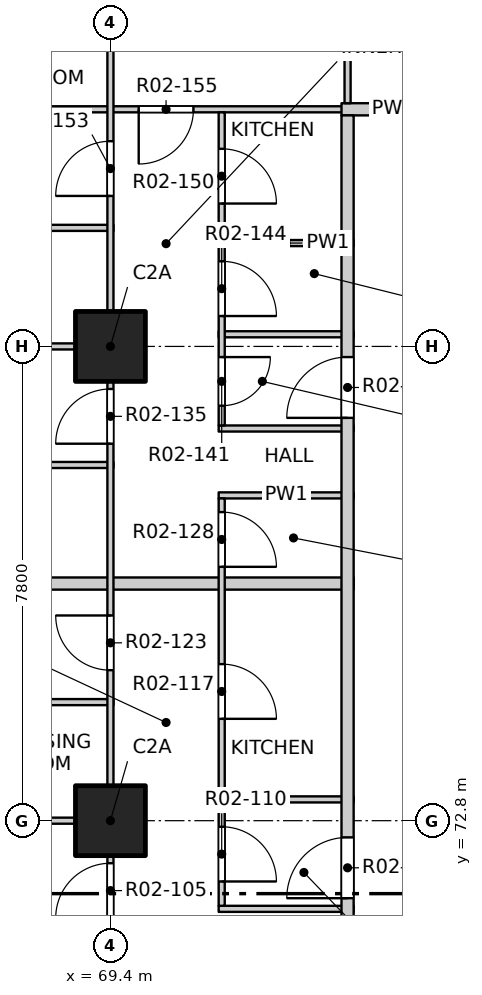
"""IFC4 building model, lengths in metres.
Left out: names, types, materials, properties, quantities, classifications, styles, units other than length and angle.
Written with IfcOpenShell. Run it as: python <this file> out.ifc"""

import sys

from ifc_helpers import new_model, si_unit, direction, frame, frame_2d, origin, origin_2d, place, context, subcontext, project, spatial, rectangle, extrude, element, fill, save


model = new_model("IFC4")
c1 = context("Model", 3, precision=1e-05, world=origin(), true_north=direction((0.0, 1.0)))
c2 = subcontext(c1, "Body", "Model", "MODEL_VIEW")
j1 = project(units=[si_unit("LENGTHUNIT", "METRE"), si_unit("PLANEANGLEUNIT", "RADIAN")], contexts=[c1])
p1 = place(None, origin())
s1 = spatial("IfcSite", under=j1, at=p1, CompositionType="ELEMENT")
p2 = place(p1, origin())
s2 = spatial("IfcBuilding", under=s1, at=p2, CompositionType="ELEMENT")
p3 = place(p2, frame((0.0, 0.0, 36.5)))
s3 = spatial("IfcBuildingStorey", under=s2, at=p3, CompositionType="ELEMENT", Elevation=36.5)
for number, where, z_axis, x_axis in (
    (1, (69.4, 72.8, -0.25), (0.0, 0.0, 1.0), (1.0, 0.0, 0.0)),
    (2, (69.4, 80.6, -0.25), (0.0, 0.0, 1.0), (1.0, 0.0, 0.0)),
):
    element("IfcColumn", number, at=place(p3, frame(where, z_axis=z_axis, x_axis=x_axis)), inside=s3, PredefinedType="COLUMN", context=c2, shape_type="SweptSolid", body=[
        extrude(rectangle(XDim=1.15, YDim=1.15, at=origin_2d()), origin(), (0.0, 0.0, 1.0), 3.4),
    ])
p4 = place(p3, frame((71.18, 71.35, 0.0), z_axis=(0.0, 0.0, 1.0), x_axis=(1.0, 0.0, 0.0)))
e3 = element("IfcWall", 3, at=p4, inside=s3, PredefinedType="PARTITIONING", context=c2, shape_type="SweptSolid", body=[
    extrude(rectangle(XDim=2.22, YDim=0.1, at=frame_2d((1.11, 0.0))), origin(), (0.0, 0.0, 1.0), 3.15),
])
p5 = place(p3, frame((61.9, 72.8, 0.0), z_axis=(0.0, 0.0, 1.0), x_axis=(1.0, 0.0, 0.0)))
e4 = element("IfcWall", 4, at=p5, inside=s3, PredefinedType="PARTITIONING", context=c2, shape_type="SweptSolid", body=[
    extrude(rectangle(XDim=7.55, YDim=0.1, at=frame_2d((3.775, 0.0))), origin(), (0.0, 0.0, 1.0), 2.55),
])
p6 = place(p3, frame((71.18, 73.15, 0.0), z_axis=(0.0, 0.0, 1.0), x_axis=(1.0, 0.0, 0.0)))
e5 = element("IfcWall", 5, at=p6, inside=s3, PredefinedType="PARTITIONING", context=c2, shape_type="SweptSolid", body=[
    extrude(rectangle(XDim=2.22, YDim=0.1, at=frame_2d((1.11, 0.0))), origin(), (0.0, 0.0, 1.0), 3.15),
])
p7 = place(p3, frame((66.05, 74.75, 0.0), z_axis=(0.0, 0.0, 1.0), x_axis=(1.0, 0.0, 0.0)))
e6 = element("IfcWall", 6, at=p7, inside=s3, PredefinedType="PARTITIONING", context=c2, shape_type="SweptSolid", body=[
    extrude(rectangle(XDim=3.4, YDim=0.1, at=frame_2d((1.7, 0.0))), origin(), (0.0, 0.0, 1.0), 3.15),
])
p8 = place(p3, frame((61.9, 76.7, 0.0), z_axis=(0.0, 0.0, 1.0), x_axis=(1.0, 0.0, 0.0)))
e7 = element("IfcWall", 7, at=p8, inside=s3, PredefinedType="PARTITIONING", context=c2, shape_type="SweptSolid", body=[
    extrude(rectangle(XDim=11.5, YDim=0.2, at=frame_2d((5.75, 0.0))), origin(), (0.0, 0.0, 1.0), 3.15),
])
p9 = place(p3, frame((71.18, 78.15, 0.0), z_axis=(0.0, 0.0, 1.0), x_axis=(1.0, 0.0, 0.0)))
e8 = element("IfcWall", 8, at=p9, inside=s3, PredefinedType="PARTITIONING", context=c2, shape_type="SweptSolid", body=[
    extrude(rectangle(XDim=2.22, YDim=0.1, at=frame_2d((1.11, 0.0))), origin(), (0.0, 0.0, 1.0), 3.15),
])
p10 = place(p3, frame((65.75, 78.65, 0.0), z_axis=(0.0, 0.0, 1.0), x_axis=(1.0, 0.0, 0.0)))
e9 = element("IfcWall", 9, at=p10, inside=s3, PredefinedType="PARTITIONING", context=c2, shape_type="SweptSolid", body=[
    extrude(rectangle(XDim=3.7, YDim=0.1, at=frame_2d((1.85, 0.0))), origin(), (0.0, 0.0, 1.0), 3.15),
])
p11 = place(p3, frame((71.18, 79.25, 0.0), z_axis=(0.0, 0.0, 1.0), x_axis=(1.0, 0.0, 0.0)))
e10 = element("IfcWall", 10, at=p11, inside=s3, PredefinedType="PARTITIONING", context=c2, shape_type="SweptSolid", body=[
    extrude(rectangle(XDim=2.22, YDim=0.1, at=frame_2d((1.11, 0.0))), origin(), (0.0, 0.0, 1.0), 3.15),
])
p12 = place(p3, frame((61.9, 80.6, 0.0), z_axis=(0.0, 0.0, 1.0), x_axis=(1.0, 0.0, 0.0)))
e11 = element("IfcWall", 11, at=p12, inside=s3, PredefinedType="PARTITIONING", context=c2, shape_type="SweptSolid", body=[
    extrude(rectangle(XDim=7.55, YDim=0.1, at=frame_2d((3.775, 0.0))), origin(), (0.0, 0.0, 1.0), 2.55),
])
for number, where, z_axis, x_axis in (
    (12, (71.18, 80.8, 0.0), (0.0, 0.0, 1.0), (1.0, 0.0, 0.0)),
    (13, (71.18, 82.3, 0.0), (0.0, 0.0, 1.0), (1.0, 0.0, 0.0)),
):
    element("IfcWall", number, at=place(p3, frame(where, z_axis=z_axis, x_axis=x_axis)), inside=s3, PredefinedType="PARTITIONING", context=c2, shape_type="SweptSolid", body=[
        extrude(rectangle(XDim=2.22, YDim=0.1, at=frame_2d((1.11, 0.0))), origin(), (0.0, 0.0, 1.0), 3.15),
    ])
p13 = place(p3, frame((65.75, 82.55, 0.0), z_axis=(0.0, 0.0, 1.0), x_axis=(1.0, 0.0, 0.0)))
e14 = element("IfcWall", 14, at=p13, inside=s3, PredefinedType="PARTITIONING", context=c2, shape_type="SweptSolid", body=[
    extrude(rectangle(XDim=3.7, YDim=0.1, at=frame_2d((1.85, 0.0))), origin(), (0.0, 0.0, 1.0), 3.15),
])
p14 = place(p3, frame((61.9, 84.5, 0.0), z_axis=(0.0, 0.0, 1.0), x_axis=(1.0, 0.0, 0.0)))
e15 = element("IfcWall", 15, at=p14, inside=s3, PredefinedType="PARTITIONING", context=c2, shape_type="SweptSolid", body=[
    extrude(rectangle(XDim=11.5, YDim=0.1, at=frame_2d((5.75, 0.0))), origin(), (0.0, 0.0, 1.0), 3.15),
])
p15 = place(p14, frame((7.965, 0.0, 0.0)))
e16 = element("IfcOpeningElement", 16, at=p15, cuts=e15, PredefinedType="OPENING", context=c2, shape_type="SweptSolid", body=[
    extrude(rectangle(XDim=0.9, YDim=2.1, at=frame_2d((0.45, 1.05))), frame((0.0, 0.06, 0.0), z_axis=(0.0, -1.0, 0.0), x_axis=(1.0, 0.0, 0.0)), (0.0, 0.0, 1.0), 0.12),
])
p16 = place(p3, frame((73.2, 84.5, 0.0), z_axis=(0.0, 0.0, 1.0), x_axis=(1.0, 0.0, 0.0)))
e17 = element("IfcWall", 17, at=p16, inside=s3, PredefinedType="PARTITIONING", context=c2, shape_type="SweptSolid", body=[
    extrude(rectangle(XDim=1.7, YDim=0.2, at=frame_2d((0.85, 0.0))), origin(), (0.0, 0.0, 1.0), 3.15),
])
p17 = place(p3, frame((69.4, 41.9, 0.0), z_axis=(0.0, 0.0, 1.0), x_axis=(0.0, 1.0, 0.0)))
e18 = element("IfcWall", 18, at=p17, inside=s3, PredefinedType="PARTITIONING", context=c2, shape_type="SweptSolid", body=[
    extrude(rectangle(XDim=46.2, YDim=0.1, at=frame_2d((23.1, 0.0))), origin(), (0.0, 0.0, 1.0), 3.15),
])
p18 = place(p17, frame((1.2, 0.0, 0.0)))
e19 = element("IfcOpeningElement", 19, at=p18, cuts=e18, PredefinedType="OPENING", context=c2, shape_type="SweptSolid", body=[
    extrude(rectangle(XDim=0.9, YDim=2.1, at=frame_2d((0.45, 1.05))), frame((0.0, 0.06, 0.0), z_axis=(0.0, -1.0, 0.0), x_axis=(1.0, 0.0, 0.0)), (0.0, 0.0, 1.0), 0.12),
])
p19 = place(p17, frame((5.1, 0.0, 0.0)))
e20 = element("IfcOpeningElement", 20, at=p19, cuts=e18, PredefinedType="OPENING", context=c2, shape_type="SweptSolid", body=[
    extrude(rectangle(XDim=0.9, YDim=2.1, at=frame_2d((0.45, 1.05))), frame((0.0, 0.06, 0.0), z_axis=(0.0, -1.0, 0.0), x_axis=(1.0, 0.0, 0.0)), (0.0, 0.0, 1.0), 0.12),
])
p20 = place(p17, frame((9.975, 0.0, 0.0)))
e21 = element("IfcOpeningElement", 21, at=p20, cuts=e18, PredefinedType="OPENING", context=c2, shape_type="SweptSolid", body=[
    extrude(rectangle(XDim=0.9, YDim=2.1, at=frame_2d((0.45, 1.05))), frame((0.0, 0.06, 0.0), z_axis=(0.0, -1.0, 0.0), x_axis=(1.0, 0.0, 0.0)), (0.0, 0.0, 1.0), 0.12),
])
p21 = place(p17, frame((12.9, 0.0, 0.0)))
e22 = element("IfcOpeningElement", 22, at=p21, cuts=e18, PredefinedType="OPENING", context=c2, shape_type="SweptSolid", body=[
    extrude(rectangle(XDim=0.9, YDim=2.1, at=frame_2d((0.45, 1.05))), frame((0.0, 0.06, 0.0), z_axis=(0.0, -1.0, 0.0), x_axis=(1.0, 0.0, 0.0)), (0.0, 0.0, 1.0), 0.12),
])
p22 = place(p17, frame((17.775, 0.0, 0.0)))
e23 = element("IfcOpeningElement", 23, at=p22, cuts=e18, PredefinedType="OPENING", context=c2, shape_type="SweptSolid", body=[
    extrude(rectangle(XDim=0.9, YDim=2.1, at=frame_2d((0.45, 1.05))), frame((0.0, 0.06, 0.0), z_axis=(0.0, -1.0, 0.0), x_axis=(1.0, 0.0, 0.0)), (0.0, 0.0, 1.0), 0.12),
])
p23 = place(p17, frame((21.5, 0.0, 0.0)))
e24 = element("IfcOpeningElement", 24, at=p23, cuts=e18, PredefinedType="OPENING", context=c2, shape_type="SweptSolid", body=[
    extrude(rectangle(XDim=0.9, YDim=2.1, at=frame_2d((0.45, 1.05))), frame((0.0, 0.06, 0.0), z_axis=(0.0, -1.0, 0.0), x_axis=(1.0, 0.0, 0.0)), (0.0, 0.0, 1.0), 0.12),
])
p24 = place(p17, frame((24.6, 0.0, 0.0)))
e25 = element("IfcOpeningElement", 25, at=p24, cuts=e18, PredefinedType="OPENING", context=c2, shape_type="SweptSolid", body=[
    extrude(rectangle(XDim=0.9, YDim=2.1, at=frame_2d((0.45, 1.05))), frame((0.0, 0.06, 0.0), z_axis=(0.0, -1.0, 0.0), x_axis=(1.0, 0.0, 0.0)), (0.0, 0.0, 1.0), 0.12),
])
p25 = place(p17, frame((29.3, 0.0, 0.0)))
e26 = element("IfcOpeningElement", 26, at=p25, cuts=e18, PredefinedType="OPENING", context=c2, shape_type="SweptSolid", body=[
    extrude(rectangle(XDim=0.9, YDim=2.1, at=frame_2d((0.45, 1.05))), frame((0.0, 0.06, 0.0), z_axis=(0.0, -1.0, 0.0), x_axis=(1.0, 0.0, 0.0)), (0.0, 0.0, 1.0), 0.12),
])
p26 = place(p17, frame((33.375, 0.0, 0.0)))
e27 = element("IfcOpeningElement", 27, at=p26, cuts=e18, PredefinedType="OPENING", context=c2, shape_type="SweptSolid", body=[
    extrude(rectangle(XDim=0.9, YDim=2.1, at=frame_2d((0.45, 1.05))), frame((0.0, 0.06, 0.0), z_axis=(0.0, -1.0, 0.0), x_axis=(1.0, 0.0, 0.0)), (0.0, 0.0, 1.0), 0.12),
])
p27 = place(p17, frame((37.1, 0.0, 0.0)))
e28 = element("IfcOpeningElement", 28, at=p27, cuts=e18, PredefinedType="OPENING", context=c2, shape_type="SweptSolid", body=[
    extrude(rectangle(XDim=0.9, YDim=2.1, at=frame_2d((0.45, 1.05))), frame((0.0, 0.06, 0.0), z_axis=(0.0, -1.0, 0.0), x_axis=(1.0, 0.0, 0.0)), (0.0, 0.0, 1.0), 0.12),
])
p28 = place(p17, frame((41.175, 0.0, 0.0)))
e29 = element("IfcOpeningElement", 29, at=p28, cuts=e18, PredefinedType="OPENING", context=c2, shape_type="SweptSolid", body=[
    extrude(rectangle(XDim=0.9, YDim=2.1, at=frame_2d((0.45, 1.05))), frame((0.0, 0.06, 0.0), z_axis=(0.0, -1.0, 0.0), x_axis=(1.0, 0.0, 0.0)), (0.0, 0.0, 1.0), 0.12),
])
p29 = place(p17, frame((44.1, 0.0, 0.0)))
e30 = element("IfcOpeningElement", 30, at=p29, cuts=e18, PredefinedType="OPENING", context=c2, shape_type="SweptSolid", body=[
    extrude(rectangle(XDim=0.9, YDim=2.1, at=frame_2d((0.45, 1.05))), frame((0.0, 0.06, 0.0), z_axis=(0.0, -1.0, 0.0), x_axis=(1.0, 0.0, 0.0)), (0.0, 0.0, 1.0), 0.12),
])
p30 = place(p3, frame((71.23, 71.4, 0.0), z_axis=(0.0, 0.0, 1.0), x_axis=(0.0, 1.0, 0.0)))
e31 = element("IfcWall", 31, at=p30, inside=s3, PredefinedType="PARTITIONING", context=c2, shape_type="SweptSolid", body=[
    extrude(rectangle(XDim=6.7, YDim=0.1, at=frame_2d((3.35, 0.0))), origin(), (0.0, 0.0, 1.0), 3.15),
])
p31 = place(p30, frame((0.4, 0.0, 0.0)))
e32 = element("IfcOpeningElement", 32, at=p31, cuts=e31, PredefinedType="OPENING", context=c2, shape_type="SweptSolid", body=[
    extrude(rectangle(XDim=0.9, YDim=2.1, at=frame_2d((0.45, 1.05))), frame((0.0, 0.06, 0.0), z_axis=(0.0, -1.0, 0.0), x_axis=(1.0, 0.0, 0.0)), (0.0, 0.0, 1.0), 0.12),
])
p32 = place(p30, frame((3.075, 0.0, 0.0)))
e33 = element("IfcOpeningElement", 33, at=p32, cuts=e31, PredefinedType="OPENING", context=c2, shape_type="SweptSolid", body=[
    extrude(rectangle(XDim=0.9, YDim=2.1, at=frame_2d((0.45, 1.05))), frame((0.0, 0.06, 0.0), z_axis=(0.0, -1.0, 0.0), x_axis=(1.0, 0.0, 0.0)), (0.0, 0.0, 1.0), 0.12),
])
p33 = place(p30, frame((5.575, 0.0, 0.0)))
e34 = element("IfcOpeningElement", 34, at=p33, cuts=e31, PredefinedType="OPENING", context=c2, shape_type="SweptSolid", body=[
    extrude(rectangle(XDim=0.9, YDim=2.1, at=frame_2d((0.45, 1.05))), frame((0.0, 0.06, 0.0), z_axis=(0.0, -1.0, 0.0), x_axis=(1.0, 0.0, 0.0)), (0.0, 0.0, 1.0), 0.12),
])
p34 = place(p3, frame((71.23, 79.3, 0.0), z_axis=(0.0, 0.0, 1.0), x_axis=(0.0, 1.0, 0.0)))
e35 = element("IfcWall", 35, at=p34, inside=s3, PredefinedType="PARTITIONING", context=c2, shape_type="SweptSolid", body=[
    extrude(rectangle(XDim=5.15, YDim=0.1, at=frame_2d((2.575, 0.0))), origin(), (0.0, 0.0, 1.0), 3.15),
])
p35 = place(p34, frame((0.325, 0.0, 0.0)))
e36 = element("IfcOpeningElement", 36, at=p35, cuts=e35, PredefinedType="OPENING", context=c2, shape_type="SweptSolid", body=[
    extrude(rectangle(XDim=0.8, YDim=2.1, at=frame_2d((0.4, 1.05))), frame((0.0, 0.06, 0.0), z_axis=(0.0, -1.0, 0.0), x_axis=(1.0, 0.0, 0.0)), (0.0, 0.0, 1.0), 0.12),
])
p36 = place(p34, frame((1.8, 0.0, 0.0)))
e37 = element("IfcOpeningElement", 37, at=p36, cuts=e35, PredefinedType="OPENING", context=c2, shape_type="SweptSolid", body=[
    extrude(rectangle(XDim=0.9, YDim=2.1, at=frame_2d((0.45, 1.05))), frame((0.0, 0.06, 0.0), z_axis=(0.0, -1.0, 0.0), x_axis=(1.0, 0.0, 0.0)), (0.0, 0.0, 1.0), 0.12),
])
p37 = place(p34, frame((3.65, 0.0, 0.0)))
e38 = element("IfcOpeningElement", 38, at=p37, cuts=e35, PredefinedType="OPENING", context=c2, shape_type="SweptSolid", body=[
    extrude(rectangle(XDim=0.9, YDim=2.1, at=frame_2d((0.45, 1.05))), frame((0.0, 0.06, 0.0), z_axis=(0.0, -1.0, 0.0), x_axis=(1.0, 0.0, 0.0)), (0.0, 0.0, 1.0), 0.12),
])
p38 = place(p3, frame((73.3, 53.4, 0.0), z_axis=(0.0, 0.0, 1.0), x_axis=(0.0, 1.0, 0.0)))
e39 = element("IfcWall", 39, at=p38, inside=s3, PredefinedType="PARTITIONING", context=c2, shape_type="SweptSolid", body=[
    extrude(rectangle(XDim=31.0, YDim=0.2, at=frame_2d((15.5, 0.0))), origin(), (0.0, 0.0, 1.0), 3.15),
])
p39 = place(p38, frame((2.675, 0.0, 0.0)))
e40 = element("IfcOpeningElement", 40, at=p39, cuts=e39, PredefinedType="OPENING", context=c2, shape_type="SweptSolid", body=[
    extrude(rectangle(XDim=1.0, YDim=2.1, at=frame_2d((0.5, 1.05))), frame((0.0, 0.11, 0.0), z_axis=(0.0, -1.0, 0.0), x_axis=(1.0, 0.0, 0.0)), (0.0, 0.0, 1.0), 0.22),
])
p40 = place(p38, frame((18.125, 0.0, 0.0)))
e41 = element("IfcOpeningElement", 41, at=p40, cuts=e39, PredefinedType="OPENING", context=c2, shape_type="SweptSolid", body=[
    extrude(rectangle(XDim=1.0, YDim=2.1, at=frame_2d((0.5, 1.05))), frame((0.0, 0.11, 0.0), z_axis=(0.0, -1.0, 0.0), x_axis=(1.0, 0.0, 0.0)), (0.0, 0.0, 1.0), 0.22),
])
p41 = place(p38, frame((26.025, 0.0, 0.0)))
e42 = element("IfcOpeningElement", 42, at=p41, cuts=e39, PredefinedType="OPENING", context=c2, shape_type="SweptSolid", body=[
    extrude(rectangle(XDim=1.0, YDim=2.1, at=frame_2d((0.5, 1.05))), frame((0.0, 0.11, 0.0), z_axis=(0.0, -1.0, 0.0), x_axis=(1.0, 0.0, 0.0)), (0.0, 0.0, 1.0), 0.22),
])
p42 = place(p3, frame((73.3, 84.6, 0.0), z_axis=(0.0, 0.0, 1.0), x_axis=(0.0, 1.0, 0.0)))
e43 = element("IfcWall", 43, at=p42, inside=s3, PredefinedType="PARTITIONING", context=c2, shape_type="SweptSolid", body=[
    extrude(rectangle(XDim=3.5, YDim=0.1, at=frame_2d((1.75, 0.0))), origin(), (0.0, 0.0, 1.0), 3.15),
])
p43 = place(p42, frame((1.4, 0.0, 0.0)))
e44 = element("IfcOpeningElement", 44, at=p43, cuts=e43, PredefinedType="OPENING", context=c2, shape_type="SweptSolid", body=[
    extrude(rectangle(XDim=0.9, YDim=2.1, at=frame_2d((0.45, 1.05))), frame((0.0, 0.06, 0.0), z_axis=(0.0, -1.0, 0.0), x_axis=(1.0, 0.0, 0.0)), (0.0, 0.0, 1.0), 0.12),
])
p44 = place(p25, origin())
e45 = element("IfcDoor", 45, at=p44, inside=s3, OperationType="SINGLE_SWING_LEFT", PredefinedType="DOOR", context=c2, shape_type="SweptSolid", body=[
    extrude(rectangle(XDim=0.9, YDim=2.1, at=frame_2d((0.45, 1.05))), frame((0.0, 0.025, 0.0), z_axis=(0.0, -1.0, 0.0), x_axis=(1.0, 0.0, 0.0)), (0.0, 0.0, 1.0), 0.05),
])
fill(e26, e45)
p45 = place(p40, origin())
e46 = element("IfcDoor", 46, at=p45, inside=s3, OperationType="SINGLE_SWING_RIGHT", PredefinedType="DOOR", context=c2, shape_type="SweptSolid", body=[
    extrude(rectangle(XDim=1.0, YDim=2.1, at=frame_2d((0.5, 1.05))), frame((0.0, 0.025, 0.0), z_axis=(0.0, -1.0, 0.0), x_axis=(1.0, 0.0, 0.0)), (0.0, 0.0, 1.0), 0.05),
])
fill(e41, e46)
p46 = place(p31, origin())
e47 = element("IfcDoor", 47, at=p46, inside=s3, OperationType="SINGLE_SWING_RIGHT", PredefinedType="DOOR", context=c2, shape_type="SweptSolid", body=[
    extrude(rectangle(XDim=0.9, YDim=2.1, at=frame_2d((0.45, 1.05))), frame((0.0, 0.025, 0.0), z_axis=(0.0, -1.0, 0.0), x_axis=(1.0, 0.0, 0.0)), (0.0, 0.0, 1.0), 0.05),
])
fill(e32, e47)
p47 = place(p32, origin())
e48 = element("IfcDoor", 48, at=p47, inside=s3, OperationType="SINGLE_SWING_RIGHT", PredefinedType="DOOR", context=c2, shape_type="SweptSolid", body=[
    extrude(rectangle(XDim=0.9, YDim=2.1, at=frame_2d((0.45, 1.05))), frame((0.0, 0.025, 0.0), z_axis=(0.0, -1.0, 0.0), x_axis=(1.0, 0.0, 0.0)), (0.0, 0.0, 1.0), 0.05),
])
fill(e33, e48)
p48 = place(p26, origin())
e49 = element("IfcDoor", 49, at=p48, inside=s3, OperationType="SINGLE_SWING_RIGHT", PredefinedType="DOOR", context=c2, shape_type="SweptSolid", body=[
    extrude(rectangle(XDim=0.9, YDim=2.1, at=frame_2d((0.45, 1.05))), frame((0.0, 0.025, 0.0), z_axis=(0.0, -1.0, 0.0), x_axis=(1.0, 0.0, 0.0)), (0.0, 0.0, 1.0), 0.05),
])
fill(e27, e49)
p49 = place(p33, origin())
e50 = element("IfcDoor", 50, at=p49, inside=s3, OperationType="SINGLE_SWING_RIGHT", PredefinedType="DOOR", context=c2, shape_type="SweptSolid", body=[
    extrude(rectangle(XDim=0.9, YDim=2.1, at=frame_2d((0.45, 1.05))), frame((0.0, 0.025, 0.0), z_axis=(0.0, -1.0, 0.0), x_axis=(1.0, 0.0, 0.0)), (0.0, 0.0, 1.0), 0.05),
])
fill(e34, e50)
p50 = place(p27, origin())
e51 = element("IfcDoor", 51, at=p50, inside=s3, OperationType="SINGLE_SWING_LEFT", PredefinedType="DOOR", context=c2, shape_type="SweptSolid", body=[
    extrude(rectangle(XDim=0.9, YDim=2.1, at=frame_2d((0.45, 1.05))), frame((0.0, 0.025, 0.0), z_axis=(0.0, -1.0, 0.0), x_axis=(1.0, 0.0, 0.0)), (0.0, 0.0, 1.0), 0.05),
])
fill(e28, e51)
p51 = place(p41, origin())
e52 = element("IfcDoor", 52, at=p51, inside=s3, OperationType="SINGLE_SWING_RIGHT", PredefinedType="DOOR", context=c2, shape_type="SweptSolid", body=[
    extrude(rectangle(XDim=1.0, YDim=2.1, at=frame_2d((0.5, 1.05))), frame((0.0, 0.025, 0.0), z_axis=(0.0, -1.0, 0.0), x_axis=(1.0, 0.0, 0.0)), (0.0, 0.0, 1.0), 0.05),
])
fill(e42, e52)
p52 = place(p35, origin())
e53 = element("IfcDoor", 53, at=p52, inside=s3, OperationType="SINGLE_SWING_LEFT", PredefinedType="DOOR", context=c2, shape_type="SweptSolid", body=[
    extrude(rectangle(XDim=0.8, YDim=2.1, at=frame_2d((0.4, 1.05))), frame((0.0, 0.025, 0.0), z_axis=(0.0, -1.0, 0.0), x_axis=(1.0, 0.0, 0.0)), (0.0, 0.0, 1.0), 0.05),
])
fill(e36, e53)
p53 = place(p36, origin())
e54 = element("IfcDoor", 54, at=p53, inside=s3, OperationType="SINGLE_SWING_RIGHT", PredefinedType="DOOR", context=c2, shape_type="SweptSolid", body=[
    extrude(rectangle(XDim=0.9, YDim=2.1, at=frame_2d((0.45, 1.05))), frame((0.0, 0.025, 0.0), z_axis=(0.0, -1.0, 0.0), x_axis=(1.0, 0.0, 0.0)), (0.0, 0.0, 1.0), 0.05),
])
fill(e37, e54)
p54 = place(p37, origin())
e55 = element("IfcDoor", 55, at=p54, inside=s3, OperationType="SINGLE_SWING_RIGHT", PredefinedType="DOOR", context=c2, shape_type="SweptSolid", body=[
    extrude(rectangle(XDim=0.9, YDim=2.1, at=frame_2d((0.45, 1.05))), frame((0.0, 0.025, 0.0), z_axis=(0.0, -1.0, 0.0), x_axis=(1.0, 0.0, 0.0)), (0.0, 0.0, 1.0), 0.05),
])
fill(e38, e55)
p55 = place(p28, origin())
e56 = element("IfcDoor", 56, at=p55, inside=s3, OperationType="SINGLE_SWING_LEFT", PredefinedType="DOOR", context=c2, shape_type="SweptSolid", body=[
    extrude(rectangle(XDim=0.9, YDim=2.1, at=frame_2d((0.45, 1.05))), frame((0.0, 0.025, 0.0), z_axis=(0.0, -1.0, 0.0), x_axis=(1.0, 0.0, 0.0)), (0.0, 0.0, 1.0), 0.05),
])
fill(e29, e56)
p56 = place(p15, origin())
e57 = element("IfcDoor", 57, at=p56, inside=s3, OperationType="SINGLE_SWING_RIGHT", PredefinedType="DOOR", context=c2, shape_type="SweptSolid", body=[
    extrude(rectangle(XDim=0.9, YDim=2.1, at=frame_2d((0.45, 1.05))), frame((0.0, 0.025, 0.0), z_axis=(0.0, -1.0, 0.0), x_axis=(1.0, 0.0, 0.0)), (0.0, 0.0, 1.0), 0.05),
])
fill(e16, e57)
save(model, sys.argv[1])
